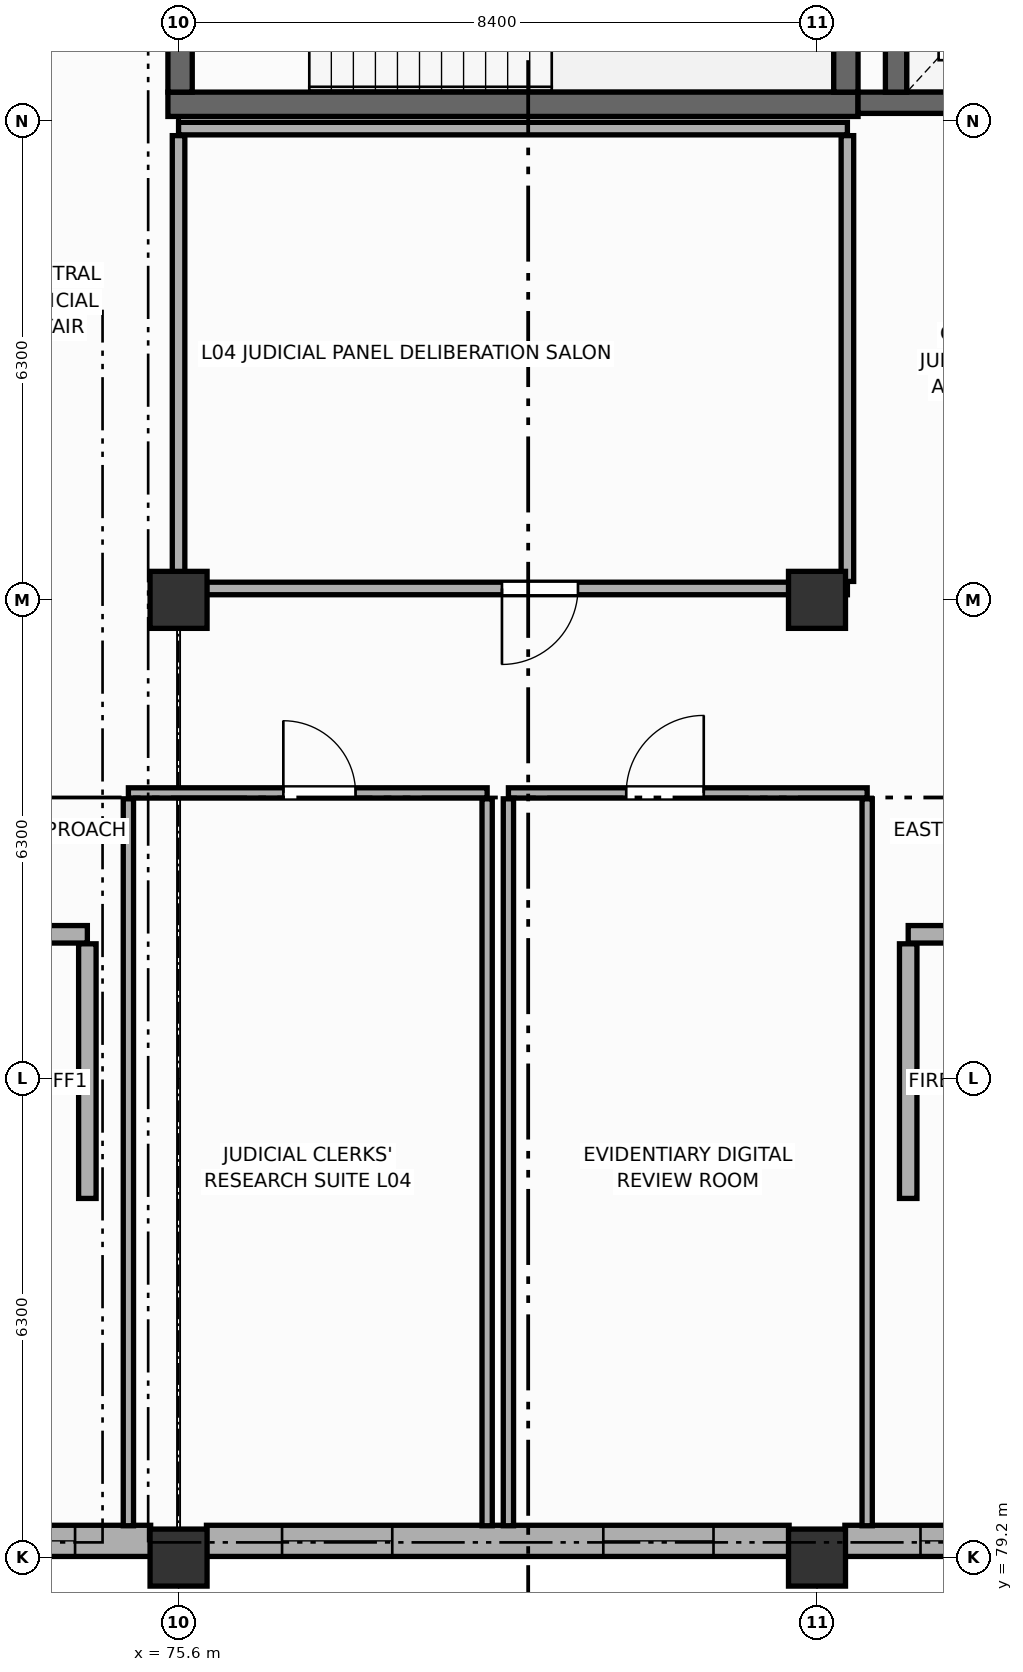
"""IFC4 building model, lengths in metres.
Left out: names, types, materials, properties, quantities, classifications, styles, units other than length and angle.
Written with IfcOpenShell. Run it as: python <this file> out.ifc"""

import sys

from ifc_helpers import new_model, si_unit, direction, frame, frame_2d, origin, origin_2d, place, context, subcontext, project, spatial, rectangle, extrude, element, fill, save


model = new_model("IFC4")
c1 = context("Model", 3, precision=1e-05, world=origin(), true_north=direction((0.0, 1.0)))
c2 = subcontext(c1, "Body", "Model", "MODEL_VIEW")
j1 = project(units=[si_unit("LENGTHUNIT", "METRE"), si_unit("PLANEANGLEUNIT", "RADIAN")], contexts=[c1])
p1 = place(None, origin())
s1 = spatial("IfcSite", under=j1, at=p1, CompositionType="ELEMENT")
p2 = place(p1, origin())
s2 = spatial("IfcBuilding", under=s1, at=p2, CompositionType="ELEMENT")
p3 = place(p2, frame((0.0, 0.0, 14.4)))
s3 = spatial("IfcBuildingStorey", under=s2, at=p3, CompositionType="ELEMENT", Elevation=14.4)
for number, where, z_axis, x_axis in (
    (1, (75.6, 79.2, 0.0), (0.0, 0.0, 1.0), (1.0, 0.0, 0.0)),
    (2, (75.6, 91.8, 0.0), (0.0, 0.0, 1.0), (1.0, 0.0, 0.0)),
    (3, (84.0, 79.2, 0.0), (0.0, 0.0, 1.0), (1.0, 0.0, 0.0)),
    (4, (84.0, 91.8, 0.0), (0.0, 0.0, 1.0), (1.0, 0.0, 0.0)),
):
    element("IfcColumn", number, at=place(p3, frame(where, z_axis=z_axis, x_axis=x_axis)), inside=s3, PredefinedType="COLUMN", context=c2, shape_type="SweptSolid", body=[
        extrude(rectangle(XDim=0.75, YDim=0.75, at=origin_2d()), origin(), (0.0, 0.0, 1.0), 4.2),
    ])
p4 = place(p3, frame((75.233, 79.42, 0.0), z_axis=(0.0, 0.0, 1.0), x_axis=(-1.0, 0.0, 0.0)))
e5 = element("IfcWall", 5, at=p4, inside=s3, PredefinedType="STANDARD", context=c2, shape_type="SweptSolid", body=[
    extrude(rectangle(XDim=7.666, YDim=0.41, at=frame_2d((3.833, 0.0))), origin(), (0.0, 0.0, 1.0), 3.09),
])
p5 = place(p4, frame((0.995, 0.0, 0.85)))
e6 = element("IfcOpeningElement", 6, at=p5, cuts=e5, PredefinedType="OPENING", context=c2, shape_type="SweptSolid", body=[
    extrude(rectangle(XDim=1.45, YDim=2.05, at=frame_2d((0.725, 1.025))), frame((0.0, 0.215, 0.0), z_axis=(0.0, -1.0, 0.0), x_axis=(1.0, 0.0, 0.0)), (0.0, 0.0, 1.0), 0.43),
])
p6 = place(p4, frame((3.108, 0.0, 0.85)))
e7 = element("IfcOpeningElement", 7, at=p6, cuts=e5, PredefinedType="OPENING", context=c2, shape_type="SweptSolid", body=[
    extrude(rectangle(XDim=1.45, YDim=2.05, at=frame_2d((0.725, 1.025))), frame((0.0, 0.215, 0.0), z_axis=(0.0, -1.0, 0.0), x_axis=(1.0, 0.0, 0.0)), (0.0, 0.0, 1.0), 0.43),
])
p7 = place(p4, frame((5.221, 0.0, 0.85)))
e8 = element("IfcOpeningElement", 8, at=p7, cuts=e5, PredefinedType="OPENING", context=c2, shape_type="SweptSolid", body=[
    extrude(rectangle(XDim=1.45, YDim=2.05, at=frame_2d((0.725, 1.025))), frame((0.0, 0.215, 0.0), z_axis=(0.0, -1.0, 0.0), x_axis=(1.0, 0.0, 0.0)), (0.0, 0.0, 1.0), 0.43),
])
p8 = place(p3, frame((83.633, 79.42, 0.0), z_axis=(0.0, 0.0, 1.0), x_axis=(-1.0, 0.0, 0.0)))
e9 = element("IfcWall", 9, at=p8, inside=s3, PredefinedType="STANDARD", context=c2, shape_type="SweptSolid", body=[
    extrude(rectangle(XDim=7.666, YDim=0.41, at=frame_2d((3.833, 0.0))), origin(), (0.0, 0.0, 1.0), 3.09),
])
p9 = place(p8, frame((0.995, 0.0, 0.85)))
e10 = element("IfcOpeningElement", 10, at=p9, cuts=e9, PredefinedType="OPENING", context=c2, shape_type="SweptSolid", body=[
    extrude(rectangle(XDim=1.45, YDim=2.05, at=frame_2d((0.725, 1.025))), frame((0.0, 0.215, 0.0), z_axis=(0.0, -1.0, 0.0), x_axis=(1.0, 0.0, 0.0)), (0.0, 0.0, 1.0), 0.43),
])
p10 = place(p8, frame((5.221, 0.0, 0.85)))
e11 = element("IfcOpeningElement", 11, at=p10, cuts=e9, PredefinedType="OPENING", context=c2, shape_type="SweptSolid", body=[
    extrude(rectangle(XDim=1.45, YDim=2.05, at=frame_2d((0.725, 1.025))), frame((0.0, 0.215, 0.0), z_axis=(0.0, -1.0, 0.0), x_axis=(1.0, 0.0, 0.0)), (0.0, 0.0, 1.0), 0.43),
])
p11 = place(p3, frame((92.033, 79.42, 0.0), z_axis=(0.0, 0.0, 1.0), x_axis=(-1.0, 0.0, 0.0)))
e12 = element("IfcWall", 12, at=p11, inside=s3, PredefinedType="STANDARD", context=c2, shape_type="SweptSolid", body=[
    extrude(rectangle(XDim=7.666, YDim=0.41, at=frame_2d((3.833, 0.0))), origin(), (0.0, 0.0, 1.0), 3.09),
])
p12 = place(p11, frame((0.995, 0.0, 0.85)))
e13 = element("IfcOpeningElement", 13, at=p12, cuts=e12, PredefinedType="OPENING", context=c2, shape_type="SweptSolid", body=[
    extrude(rectangle(XDim=1.45, YDim=2.05, at=frame_2d((0.725, 1.025))), frame((0.0, 0.215, 0.0), z_axis=(0.0, -1.0, 0.0), x_axis=(1.0, 0.0, 0.0)), (0.0, 0.0, 1.0), 0.43),
])
p13 = place(p11, frame((3.108, 0.0, 0.85)))
e14 = element("IfcOpeningElement", 14, at=p13, cuts=e12, PredefinedType="OPENING", context=c2, shape_type="SweptSolid", body=[
    extrude(rectangle(XDim=1.45, YDim=2.05, at=frame_2d((0.725, 1.025))), frame((0.0, 0.215, 0.0), z_axis=(0.0, -1.0, 0.0), x_axis=(1.0, 0.0, 0.0)), (0.0, 0.0, 1.0), 0.43),
])
p14 = place(p11, frame((5.221, 0.0, 0.85)))
e15 = element("IfcOpeningElement", 15, at=p14, cuts=e12, PredefinedType="OPENING", context=c2, shape_type="SweptSolid", body=[
    extrude(rectangle(XDim=1.45, YDim=2.05, at=frame_2d((0.725, 1.025))), frame((0.0, 0.215, 0.0), z_axis=(0.0, -1.0, 0.0), x_axis=(1.0, 0.0, 0.0)), (0.0, 0.0, 1.0), 0.43),
])
p15 = place(p3, frame((84.54, 98.32, 0.0), z_axis=(0.0, 0.0, 1.0), x_axis=(-1.0, 0.0, 0.0)))
e16 = element("IfcWall", 16, at=p15, inside=s3, PredefinedType="SHEAR", context=c2, shape_type="SweptSolid", body=[
    extrude(rectangle(XDim=9.08, YDim=0.32, at=frame_2d((4.54, 0.0))), origin(), (0.0, 0.0, 1.0), 3.96),
])
p16 = place(p3, frame((75.62, 98.48, 0.0), z_axis=(0.0, 0.0, 1.0), x_axis=(0.0, 1.0, 0.0)))
e17 = element("IfcWall", 17, at=p16, inside=s3, PredefinedType="SHEAR", context=c2, shape_type="SweptSolid", body=[
    extrude(rectangle(XDim=3.28, YDim=0.32, at=frame_2d((1.64, 0.0))), origin(), (0.0, 0.0, 1.0), 3.96),
])
p17 = place(p16, frame((1.065, 0.0, 0.0)))
e18 = element("IfcOpeningElement", 18, at=p17, cuts=e17, PredefinedType="OPENING", context=c2, shape_type="SweptSolid", body=[
    extrude(rectangle(XDim=1.15, YDim=2.2, at=frame_2d((0.575, 1.1))), frame((0.0, 0.17, 0.0), z_axis=(0.0, -1.0, 0.0), x_axis=(1.0, 0.0, 0.0)), (0.0, 0.0, 1.0), 0.34),
])
p18 = place(p3, frame((84.38, 101.76, 0.0), z_axis=(0.0, 0.0, 1.0), x_axis=(0.0, -1.0, 0.0)))
e19 = element("IfcWall", 19, at=p18, inside=s3, PredefinedType="SHEAR", context=c2, shape_type="SweptSolid", body=[
    extrude(rectangle(XDim=3.28, YDim=0.32, at=frame_2d((1.64, 0.0))), origin(), (0.0, 0.0, 1.0), 3.96),
])
p19 = place(p3, frame((87.7, 98.34, 0.0), z_axis=(0.0, 0.0, 1.0), x_axis=(-1.0, 0.0, 0.0)))
e20 = element("IfcWall", 20, at=p19, inside=s3, PredefinedType="SHEAR", context=c2, shape_type="SweptSolid", body=[
    extrude(rectangle(XDim=3.16, YDim=0.28, at=frame_2d((1.58, 0.0))), origin(), (0.0, 0.0, 1.0), 3.96),
])
p20 = place(p19, frame((0.925, 0.0, 0.0)))
e21 = element("IfcOpeningElement", 21, at=p20, cuts=e20, PredefinedType="OPENING", context=c2, shape_type="SweptSolid", body=[
    extrude(rectangle(XDim=0.95, YDim=2.15, at=frame_2d((0.475, 1.075))), frame((0.0, 0.15, 0.0), z_axis=(0.0, -1.0, 0.0), x_axis=(1.0, 0.0, 0.0)), (0.0, 0.0, 1.0), 0.3),
])
p21 = place(p3, frame((85.04, 98.48, 0.0), z_axis=(0.0, 0.0, 1.0), x_axis=(0.0, 1.0, 0.0)))
e22 = element("IfcWall", 22, at=p21, inside=s3, PredefinedType="SHEAR", context=c2, shape_type="SweptSolid", body=[
    extrude(rectangle(XDim=2.44, YDim=0.28, at=frame_2d((1.22, 0.0))), origin(), (0.0, 0.0, 1.0), 3.96),
])
p22 = place(p3, frame((69.0, 87.4, 0.0), z_axis=(0.0, 0.0, 1.0), x_axis=(1.0, 0.0, 0.0)))
e23 = element("IfcWall", 23, at=p22, inside=s3, PredefinedType="STANDARD", context=c2, shape_type="SweptSolid", body=[
    extrude(rectangle(XDim=5.4, YDim=0.23, at=frame_2d((2.7, 0.0))), origin(), (0.0, 0.0, 1.0), 3.945),
])
p23 = place(p22, frame((2.05, 0.0, 0.0)))
e24 = element("IfcOpeningElement", 24, at=p23, cuts=e23, PredefinedType="OPENING", context=c2, shape_type="SweptSolid", body=[
    extrude(rectangle(XDim=1.3, YDim=2.2, at=frame_2d((0.65, 1.1))), frame((0.0, 0.125, 0.0), z_axis=(0.0, -1.0, 0.0), x_axis=(1.0, 0.0, 0.0)), (0.0, 0.0, 1.0), 0.25),
])
p24 = place(p3, frame((74.4, 87.275, 0.0), z_axis=(0.0, 0.0, 1.0), x_axis=(0.0, -1.0, 0.0)))
e25 = element("IfcWall", 25, at=p24, inside=s3, PredefinedType="STANDARD", context=c2, shape_type="SweptSolid", body=[
    extrude(rectangle(XDim=3.35, YDim=0.23, at=frame_2d((1.675, 0.0))), origin(), (0.0, 0.0, 1.0), 3.945),
])
p25 = place(p3, frame((85.2, 87.4, 0.0), z_axis=(0.0, 0.0, 1.0), x_axis=(1.0, 0.0, 0.0)))
e26 = element("IfcWall", 26, at=p25, inside=s3, PredefinedType="STANDARD", context=c2, shape_type="SweptSolid", body=[
    extrude(rectangle(XDim=5.4, YDim=0.23, at=frame_2d((2.7, 0.0))), origin(), (0.0, 0.0, 1.0), 3.34),
])
p26 = place(p25, frame((2.05, 0.0, 0.0)))
e27 = element("IfcOpeningElement", 27, at=p26, cuts=e26, PredefinedType="OPENING", context=c2, shape_type="SweptSolid", body=[
    extrude(rectangle(XDim=1.3, YDim=2.2, at=frame_2d((0.65, 1.1))), frame((0.0, 0.125, 0.0), z_axis=(0.0, -1.0, 0.0), x_axis=(1.0, 0.0, 0.0)), (0.0, 0.0, 1.0), 0.25),
])
p27 = place(p3, frame((85.2, 83.925, 0.0), z_axis=(0.0, 0.0, 1.0), x_axis=(0.0, 1.0, 0.0)))
e28 = element("IfcWall", 28, at=p27, inside=s3, PredefinedType="STANDARD", context=c2, shape_type="SweptSolid", body=[
    extrude(rectangle(XDim=3.35, YDim=0.23, at=frame_2d((1.675, 0.0))), origin(), (0.0, 0.0, 1.0), 3.34),
])
p28 = place(p3, frame((75.6, 98.0, 0.0), z_axis=(0.0, 0.0, 1.0), x_axis=(1.0, 0.0, 0.0)))
e29 = element("IfcWall", 29, at=p28, inside=s3, PredefinedType="PARTITIONING", context=c2, shape_type="SweptSolid", body=[
    extrude(rectangle(XDim=8.8, YDim=0.165, at=frame_2d((4.4, 0.0))), origin(), (0.0, 0.0, 1.0), 3.09),
])
p29 = place(p3, frame((84.4, 91.95, 0.0), z_axis=(0.0, 0.0, 1.0), x_axis=(-1.0, 0.0, 0.0)))
e30 = element("IfcWall", 30, at=p29, inside=s3, PredefinedType="PARTITIONING", context=c2, shape_type="SweptSolid", body=[
    extrude(rectangle(XDim=8.8, YDim=0.165, at=frame_2d((4.4, 0.0))), origin(), (0.0, 0.0, 1.0), 3.09),
])
p30 = place(p29, frame((3.545, 0.0, 0.0)))
e31 = element("IfcOpeningElement", 31, at=p30, cuts=e30, PredefinedType="OPENING", context=c2, shape_type="SweptSolid", body=[
    extrude(rectangle(XDim=1.0, YDim=2.15, at=frame_2d((0.5, 1.075))), frame((0.0, 0.093, 0.0), z_axis=(0.0, -1.0, 0.0), x_axis=(1.0, 0.0, 0.0)), (0.0, 0.0, 1.0), 0.185),
])
for number, where, z_axis, x_axis in (
    (32, (75.6, 92.042, 0.0), (0.0, 0.0, 1.0), (0.0, 1.0, 0.0)),
    (33, (84.4, 97.907, 0.0), (0.0, 0.0, 1.0), (0.0, -1.0, 0.0)),
):
    element("IfcWall", number, at=place(p3, frame(where, z_axis=z_axis, x_axis=x_axis)), inside=s3, PredefinedType="PARTITIONING", context=c2, shape_type="SweptSolid", body=[
        extrude(rectangle(XDim=5.865, YDim=0.165, at=frame_2d((2.933, 0.0))), origin(), (0.0, 0.0, 1.0), 3.09),
    ])
p31 = place(p3, frame((74.94, 89.26, 0.0), z_axis=(0.0, 0.0, 1.0), x_axis=(1.0, 0.0, 0.0)))
e34 = element("IfcWall", 34, at=p31, inside=s3, PredefinedType="PARTITIONING", context=c2, shape_type="SweptSolid", body=[
    extrude(rectangle(XDim=4.72, YDim=0.135, at=frame_2d((2.36, 0.0))), origin(), (0.0, 0.0, 1.0), 3.09),
])
p32 = place(p31, frame((2.039, 0.0, 0.0)))
e35 = element("IfcOpeningElement", 35, at=p32, cuts=e34, PredefinedType="OPENING", context=c2, shape_type="SweptSolid", body=[
    extrude(rectangle(XDim=0.95, YDim=2.15, at=frame_2d((0.475, 1.075))), frame((0.0, 0.077, 0.0), z_axis=(0.0, -1.0, 0.0), x_axis=(1.0, 0.0, 0.0)), (0.0, 0.0, 1.0), 0.155),
])
p33 = place(p3, frame((74.94, 79.619, 0.0), z_axis=(0.0, 0.0, 1.0), x_axis=(0.0, 1.0, 0.0)))
e36 = element("IfcWall", 36, at=p33, inside=s3, PredefinedType="PARTITIONING", context=c2, shape_type="SweptSolid", body=[
    extrude(rectangle(XDim=9.564, YDim=0.135, at=frame_2d((4.782, 0.0))), origin(), (0.0, 0.0, 1.0), 3.945),
])
p34 = place(p3, frame((79.66, 89.183, 0.0), z_axis=(0.0, 0.0, 1.0), x_axis=(0.0, -1.0, 0.0)))
e37 = element("IfcWall", 37, at=p34, inside=s3, PredefinedType="PARTITIONING", context=c2, shape_type="SweptSolid", body=[
    extrude(rectangle(XDim=9.564, YDim=0.135, at=frame_2d((4.782, 0.0))), origin(), (0.0, 0.0, 1.0), 3.34),
])
p35 = place(p3, frame((79.94, 89.26, 0.0), z_axis=(0.0, 0.0, 1.0), x_axis=(1.0, 0.0, 0.0)))
e38 = element("IfcWall", 38, at=p35, inside=s3, PredefinedType="PARTITIONING", context=c2, shape_type="SweptSolid", body=[
    extrude(rectangle(XDim=4.72, YDim=0.135, at=frame_2d((2.36, 0.0))), origin(), (0.0, 0.0, 1.0), 3.09),
])
p36 = place(p35, frame((1.55, 0.0, 0.0)))
e39 = element("IfcOpeningElement", 39, at=p36, cuts=e38, PredefinedType="OPENING", context=c2, shape_type="SweptSolid", body=[
    extrude(rectangle(XDim=1.02, YDim=2.15, at=frame_2d((0.51, 1.075))), frame((0.0, 0.077, 0.0), z_axis=(0.0, -1.0, 0.0), x_axis=(1.0, 0.0, 0.0)), (0.0, 0.0, 1.0), 0.155),
])
for number, where, z_axis, x_axis in (
    (40, (79.94, 79.619, 0.0), (0.0, 0.0, 1.0), (0.0, 1.0, 0.0)),
    (41, (84.66, 89.183, 0.0), (0.0, 0.0, 1.0), (0.0, -1.0, 0.0)),
):
    element("IfcWall", number, at=place(p3, frame(where, z_axis=z_axis, x_axis=x_axis)), inside=s3, PredefinedType="PARTITIONING", context=c2, shape_type="SweptSolid", body=[
        extrude(rectangle(XDim=9.564, YDim=0.135, at=frame_2d((4.782, 0.0))), origin(), (0.0, 0.0, 1.0), 3.34),
    ])
p37 = place(p5, origin())
e42 = element("IfcWindow", 42, at=p37, inside=s3, PartitioningType="SINGLE_PANEL", PredefinedType="WINDOW", context=c2, shape_type="SweptSolid", body=[
    extrude(rectangle(XDim=1.45, YDim=2.05, at=frame_2d((0.725, 1.025))), frame((0.0, 0.03, 0.0), z_axis=(0.0, -1.0, 0.0), x_axis=(1.0, 0.0, 0.0)), (0.0, 0.0, 1.0), 0.06),
])
fill(e6, e42)
p38 = place(p9, origin())
e43 = element("IfcWindow", 43, at=p38, inside=s3, PartitioningType="SINGLE_PANEL", PredefinedType="WINDOW", context=c2, shape_type="SweptSolid", body=[
    extrude(rectangle(XDim=1.45, YDim=2.05, at=frame_2d((0.725, 1.025))), frame((0.0, 0.03, 0.0), z_axis=(0.0, -1.0, 0.0), x_axis=(1.0, 0.0, 0.0)), (0.0, 0.0, 1.0), 0.06),
])
fill(e10, e43)
p39 = place(p10, origin())
e44 = element("IfcWindow", 44, at=p39, inside=s3, PartitioningType="SINGLE_PANEL", PredefinedType="WINDOW", context=c2, shape_type="SweptSolid", body=[
    extrude(rectangle(XDim=1.45, YDim=2.05, at=frame_2d((0.725, 1.025))), frame((0.0, 0.03, 0.0), z_axis=(0.0, -1.0, 0.0), x_axis=(1.0, 0.0, 0.0)), (0.0, 0.0, 1.0), 0.06),
])
fill(e11, e44)
p40 = place(p14, origin())
e45 = element("IfcWindow", 45, at=p40, inside=s3, PartitioningType="SINGLE_PANEL", PredefinedType="WINDOW", context=c2, shape_type="SweptSolid", body=[
    extrude(rectangle(XDim=1.45, YDim=2.05, at=frame_2d((0.725, 1.025))), frame((0.0, 0.03, 0.0), z_axis=(0.0, -1.0, 0.0), x_axis=(1.0, 0.0, 0.0)), (0.0, 0.0, 1.0), 0.06),
])
fill(e15, e45)
p41 = place(p30, origin())
e46 = element("IfcDoor", 46, at=p41, inside=s3, OperationType="SINGLE_SWING_RIGHT", PredefinedType="DOOR", context=c2, shape_type="SweptSolid", body=[
    extrude(rectangle(XDim=1.0, YDim=2.15, at=frame_2d((0.5, 1.075))), frame((0.0, 0.025, 0.0), z_axis=(0.0, -1.0, 0.0), x_axis=(1.0, 0.0, 0.0)), (0.0, 0.0, 1.0), 0.05),
])
fill(e31, e46)
p42 = place(p32, origin())
e47 = element("IfcDoor", 47, at=p42, inside=s3, OperationType="SINGLE_SWING_LEFT", PredefinedType="DOOR", context=c2, shape_type="SweptSolid", body=[
    extrude(rectangle(XDim=0.95, YDim=2.15, at=frame_2d((0.475, 1.075))), frame((0.0, 0.025, 0.0), z_axis=(0.0, -1.0, 0.0), x_axis=(1.0, 0.0, 0.0)), (0.0, 0.0, 1.0), 0.05),
])
fill(e35, e47)
p43 = place(p36, origin())
e48 = element("IfcDoor", 48, at=p43, inside=s3, OperationType="SINGLE_SWING_RIGHT", PredefinedType="DOOR", context=c2, shape_type="SweptSolid", body=[
    extrude(rectangle(XDim=1.02, YDim=2.15, at=frame_2d((0.51, 1.075))), frame((0.0, 0.025, 0.0), z_axis=(0.0, -1.0, 0.0), x_axis=(1.0, 0.0, 0.0)), (0.0, 0.0, 1.0), 0.05),
])
fill(e39, e48)
save(model, sys.argv[1])
